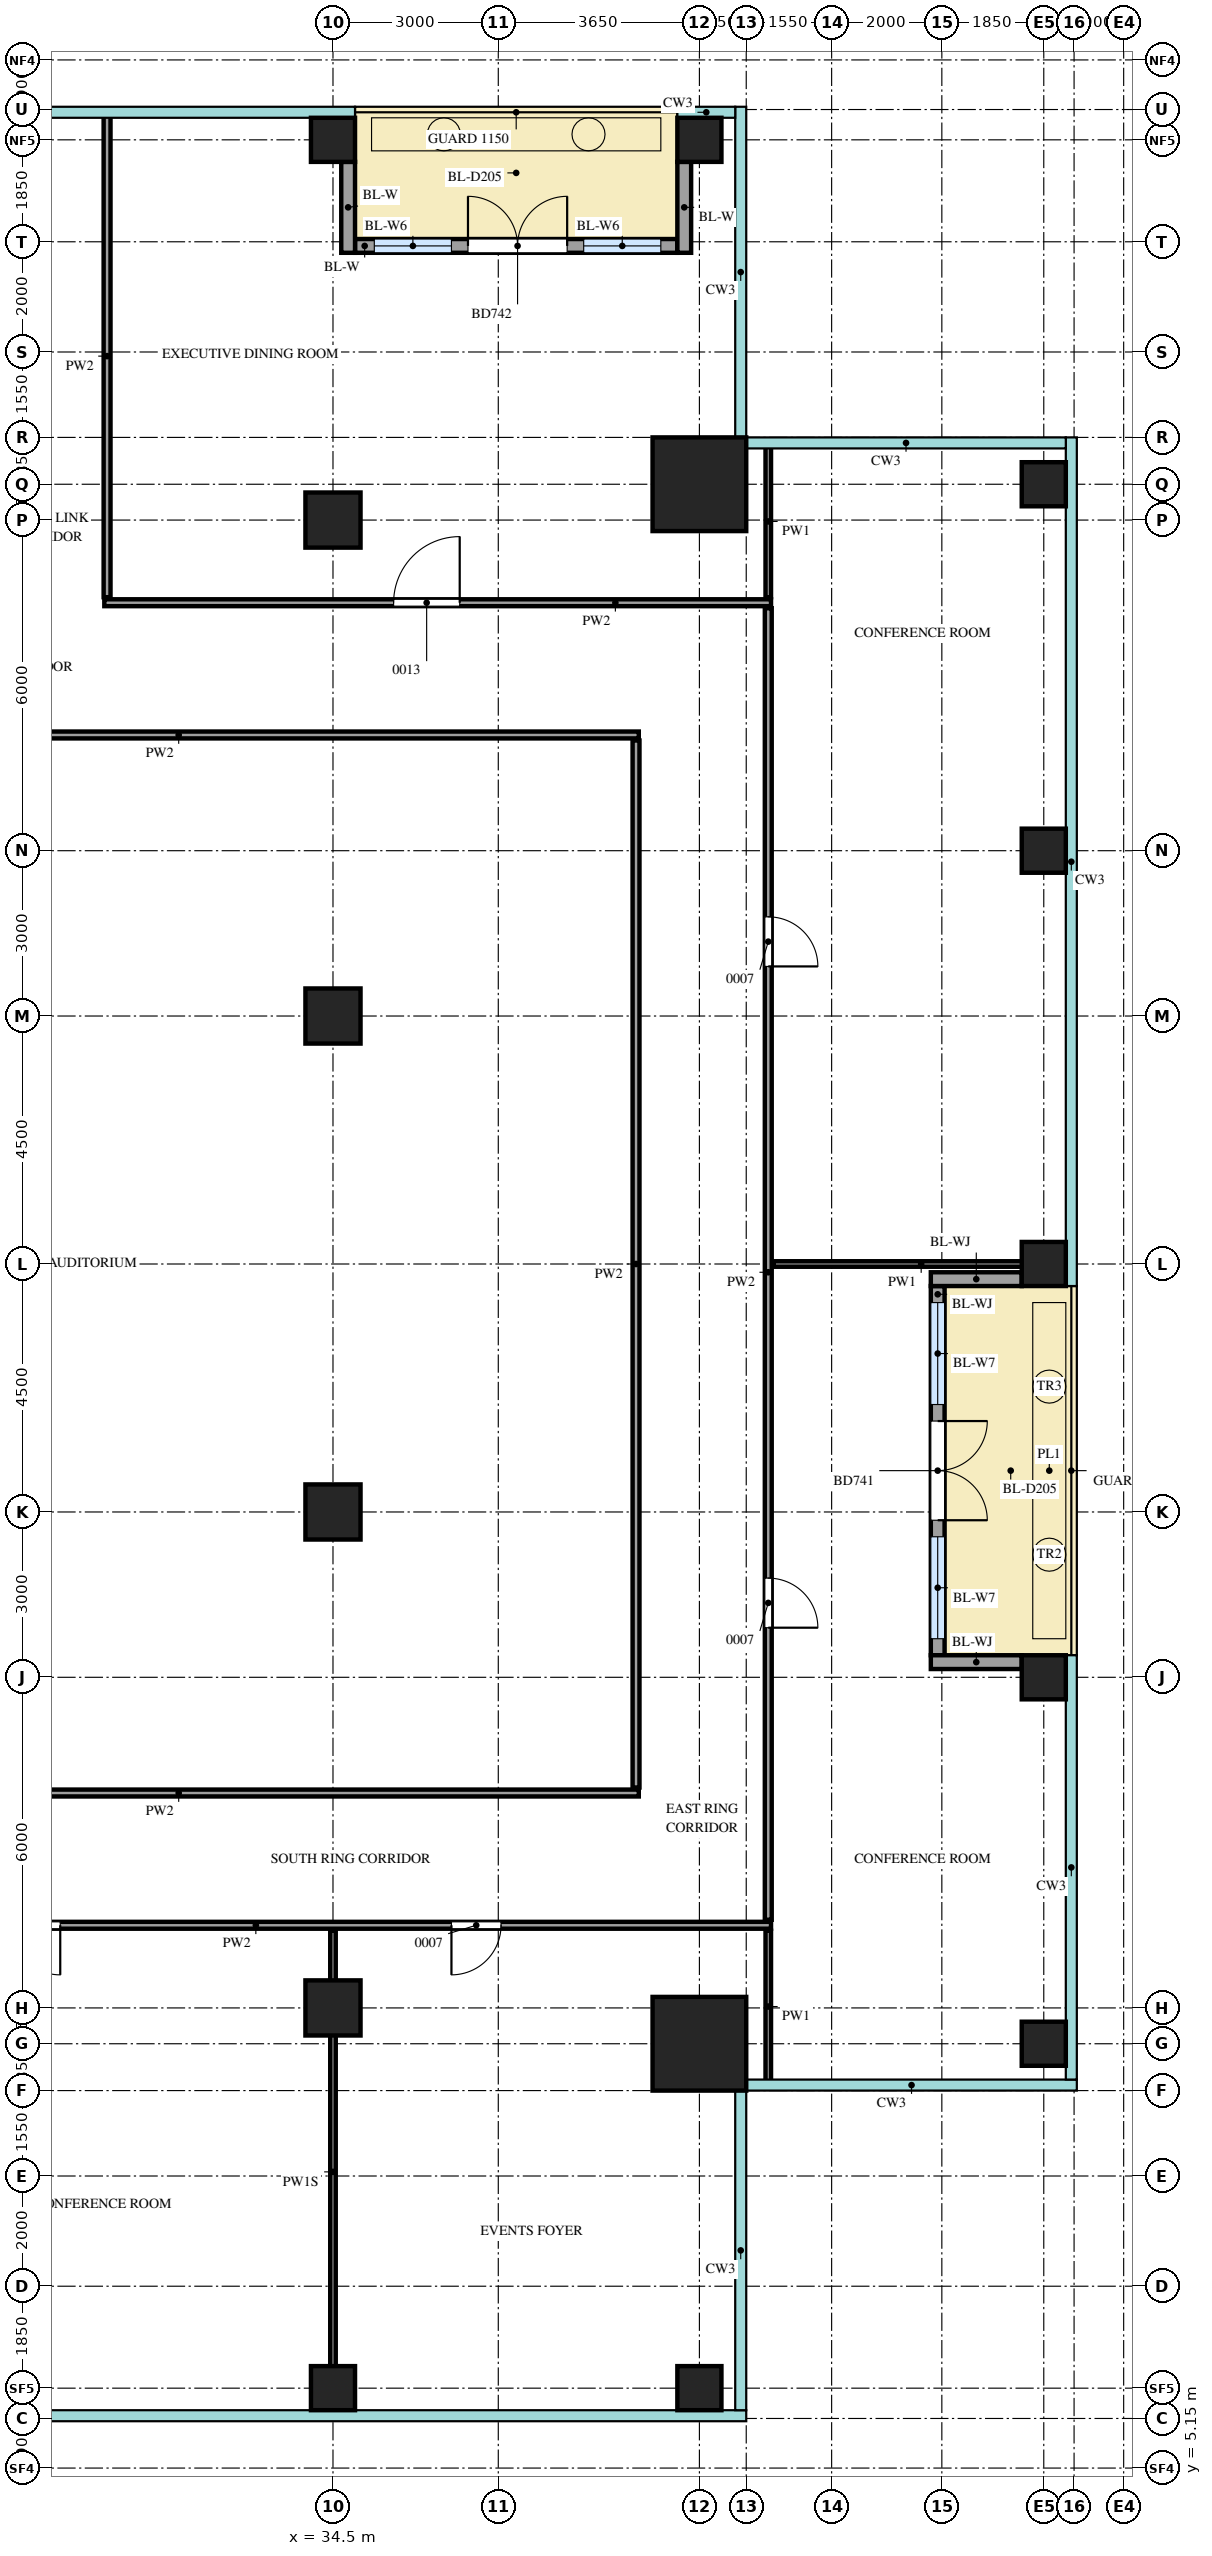
"""IFC4 building model, lengths in metres.
Left out: names, types, materials, properties, quantities, classifications, styles, units other than length and angle.
Written with IfcOpenShell. Run it as: python <this file> out.ifc"""

import sys

from ifc_helpers import new_model, si_unit, direction, frame, frame_2d, origin, origin_2d, place, context, subcontext, project, spatial, rectangle, extrude, source, transform, mapped, element, fill, save


model = new_model("IFC4")
c1 = context("Model", 3, precision=1e-05, world=origin(), true_north=direction((0.0, 1.0)))
c2 = subcontext(c1, "Body", "Model", "MODEL_VIEW")
j1 = project(units=[si_unit("LENGTHUNIT", "METRE"), si_unit("PLANEANGLEUNIT", "RADIAN")], contexts=[c1])
p1 = place(None, origin())
s1 = spatial("IfcSite", under=j1, at=p1, CompositionType="ELEMENT")
p2 = place(p1, origin())
s2 = spatial("IfcBuilding", under=s1, at=p2, CompositionType="ELEMENT")
p3 = place(p2, frame((0.0, 0.0, 326.2)))
s3 = spatial("IfcBuildingStorey", under=s2, at=p3, CompositionType="ELEMENT", Elevation=326.2)
m1 = source(origin(), c2, "Body", "SweptSolid", [
    extrude(rectangle(XDim=1.7, YDim=1.7, at=origin_2d()), origin(), (0.0, 0.0, 1.0), 3.75),
])
for number, where, z_axis, x_axis in (
    (1, (41.15, 41.15, 0.0), (0.0, 0.0, 1.0), (1.0, 0.0, 0.0)),
    (2, (41.15, 12.85, 0.0), (0.0, 0.0, 1.0), (1.0, 0.0, 0.0)),
):
    element("IfcColumn", number, at=place(p3, frame(where, z_axis=z_axis, x_axis=x_axis)), inside=s3, PredefinedType="COLUMN", context=c2, shape_type="MappedRepresentation", body=[
        mapped(m1, transform((0.0, 0.0, 0.0))),
    ])
m2 = source(origin(), c2, "Body", "SweptSolid", [
    extrude(rectangle(XDim=0.8, YDim=0.8, at=origin_2d()), origin(), (0.0, 0.0, 1.0), 3.75),
])
for number, where, z_axis, x_axis in (
    (3, (34.5, 6.6, 0.0), (0.0, 0.0, 1.0), (1.0, 0.0, 0.0)),
    (4, (41.15, 6.6, 0.0), (0.0, 0.0, 1.0), (1.0, 0.0, 0.0)),
    (5, (47.4, 12.85, 0.0), (0.0, 0.0, 1.0), (1.0, 0.0, 0.0)),
    (6, (47.4, 19.5, 0.0), (0.0, 0.0, 1.0), (1.0, 0.0, 0.0)),
    (7, (47.4, 27.0, 0.0), (0.0, 0.0, 1.0), (1.0, 0.0, 0.0)),
    (8, (47.4, 34.5, 0.0), (0.0, 0.0, 1.0), (1.0, 0.0, 0.0)),
    (9, (47.4, 41.15, 0.0), (0.0, 0.0, 1.0), (1.0, 0.0, 0.0)),
    (10, (34.5, 47.4, 0.0), (0.0, 0.0, 1.0), (1.0, 0.0, 0.0)),
    (11, (41.15, 47.4, 0.0), (0.0, 0.0, 1.0), (1.0, 0.0, 0.0)),
):
    element("IfcColumn", number, at=place(p3, frame(where, z_axis=z_axis, x_axis=x_axis)), inside=s3, PredefinedType="COLUMN", context=c2, shape_type="MappedRepresentation", body=[
        mapped(m2, transform((0.0, 0.0, 0.0))),
    ])
m3 = source(origin(), c2, "Body", "SweptSolid", [
    extrude(rectangle(XDim=1.0, YDim=1.0, at=origin_2d()), origin(), (0.0, 0.0, 1.0), 3.75),
])
for number, where, z_axis, x_axis in (
    (12, (34.5, 13.5, 0.0), (0.0, 0.0, 1.0), (1.0, 0.0, 0.0)),
    (13, (34.5, 22.5, 0.0), (0.0, 0.0, 1.0), (1.0, 0.0, 0.0)),
    (14, (34.5, 31.5, 0.0), (0.0, 0.0, 1.0), (1.0, 0.0, 0.0)),
    (15, (34.5, 40.5, 0.0), (0.0, 0.0, 1.0), (1.0, 0.0, 0.0)),
):
    element("IfcColumn", number, at=place(p3, frame(where, z_axis=z_axis, x_axis=x_axis)), inside=s3, PredefinedType="COLUMN", context=c2, shape_type="MappedRepresentation", body=[
        mapped(m3, transform((0.0, 0.0, 0.0))),
    ])
m4 = source(origin(), c2, "Body", "SweptSolid", [
    extrude(rectangle(XDim=6.7, YDim=0.25, at=frame_2d((3.35, 0.0))), origin(), (0.0, 0.0, 1.0), 3.2),
])
p4 = place(p3, frame((45.475, 19.9, 0.0), z_axis=(0.0, 0.0, 1.0), x_axis=(0.0, 1.0, 0.0)))
e16 = element("IfcWall", 16, at=p4, inside=s3, PredefinedType="SOLIDWALL", context=c2, shape_type="MappedRepresentation", body=[
    mapped(m4, transform((0.0, 0.0, 0.0))),
])
m5 = source(origin(), c2, "Body", "SweptSolid", [
    extrude(rectangle(XDim=1.85, YDim=2.4, at=frame_2d((0.925, 1.2))), frame((0.0, 0.135, 0.0), z_axis=(0.0, -1.0, 0.0), x_axis=(1.0, 0.0, 0.0)), (0.0, 0.0, 1.0), 0.27),
])
p5 = place(p4, frame((0.3, 0.0, 0.0)))
e17 = element("IfcOpeningElement", 17, at=p5, cuts=e16, PredefinedType="OPENING", context=c2, shape_type="MappedRepresentation", body=[
    mapped(m5, transform((0.0, 0.0, 0.0))),
])
p6 = place(p4, frame((4.55, 0.0, 0.0)))
e18 = element("IfcOpeningElement", 18, at=p6, cuts=e16, PredefinedType="OPENING", context=c2, shape_type="MappedRepresentation", body=[
    mapped(m5, transform((0.0, 0.0, 0.0))),
])
m6 = source(origin(), c2, "Body", "SweptSolid", [
    extrude(rectangle(XDim=1.8, YDim=2.4, at=frame_2d((0.9, 1.2))), frame((0.0, 0.135, 0.0), z_axis=(0.0, -1.0, 0.0), x_axis=(1.0, 0.0, 0.0)), (0.0, 0.0, 1.0), 0.27),
])
p7 = place(p4, frame((2.45, 0.0, 0.0)))
e19 = element("IfcOpeningElement", 19, at=p7, cuts=e16, PredefinedType="OPENING", context=c2, shape_type="MappedRepresentation", body=[
    mapped(m6, transform((0.0, 0.0, 0.0))),
])
m7 = source(origin(), c2, "Body", "SweptSolid", [
    extrude(rectangle(XDim=1.65, YDim=0.25, at=frame_2d((0.825, 0.0))), origin(), (0.0, 0.0, 1.0), 3.2),
])
for number, where, z_axis, x_axis in (
    (20, (47.0, 19.775, 0.0), (0.0, 0.0, 1.0), (-1.0, 0.0, 0.0)),
    (21, (47.0, 26.725, 0.0), (0.0, 0.0, 1.0), (-1.0, 0.0, 0.0)),
):
    element("IfcWall", number, at=place(p3, frame(where, z_axis=z_axis, x_axis=x_axis)), inside=s3, PredefinedType="SOLIDWALL", context=c2, shape_type="MappedRepresentation", body=[
        mapped(m7, transform((0.0, 0.0, 0.0))),
    ])
m8 = source(origin(), c2, "Body", "SweptSolid", [
    extrude(rectangle(XDim=5.85, YDim=0.25, at=frame_2d((2.925, 0.0))), origin(), (0.0, 0.0, 1.0), 3.75),
])
p8 = place(p3, frame((34.9, 45.475, 0.0), z_axis=(0.0, 0.0, 1.0), x_axis=(1.0, 0.0, 0.0)))
e22 = element("IfcWall", 22, at=p8, inside=s3, PredefinedType="SOLIDWALL", context=c2, shape_type="MappedRepresentation", body=[
    mapped(m8, transform((0.0, 0.0, 0.0))),
])
m9 = source(origin(), c2, "Body", "SweptSolid", [
    extrude(rectangle(XDim=1.4, YDim=2.4, at=frame_2d((0.7, 1.2))), frame((0.0, 0.135, 0.0), z_axis=(0.0, -1.0, 0.0), x_axis=(1.0, 0.0, 0.0)), (0.0, 0.0, 1.0), 0.27),
])
p9 = place(p8, frame((0.35, 0.0, 0.0)))
e23 = element("IfcOpeningElement", 23, at=p9, cuts=e22, PredefinedType="OPENING", context=c2, shape_type="MappedRepresentation", body=[
    mapped(m9, transform((0.0, 0.0, 0.0))),
])
p10 = place(p8, frame((4.15, 0.0, 0.0)))
e24 = element("IfcOpeningElement", 24, at=p10, cuts=e22, PredefinedType="OPENING", context=c2, shape_type="MappedRepresentation", body=[
    mapped(m9, transform((0.0, 0.0, 0.0))),
])
p11 = place(p8, frame((2.05, 0.0, 0.0)))
e25 = element("IfcOpeningElement", 25, at=p11, cuts=e22, PredefinedType="OPENING", context=c2, shape_type="MappedRepresentation", body=[
    mapped(m6, transform((0.0, 0.0, 0.0))),
])
m10 = source(origin(), c2, "Body", "SweptSolid", [
    extrude(rectangle(XDim=1.65, YDim=0.25, at=frame_2d((0.825, 0.0))), origin(), (0.0, 0.0, 1.0), 3.75),
])
for number, where, z_axis, x_axis in (
    (26, (34.775, 47.0, 0.0), (0.0, 0.0, 1.0), (0.0, -1.0, 0.0)),
    (27, (40.875, 47.0, 0.0), (0.0, 0.0, 1.0), (0.0, -1.0, 0.0)),
):
    element("IfcWall", number, at=place(p3, frame(where, z_axis=z_axis, x_axis=x_axis)), inside=s3, PredefinedType="SOLIDWALL", context=c2, shape_type="MappedRepresentation", body=[
        mapped(m10, transform((0.0, 0.0, 0.0))),
    ])
m11 = source(origin(), c2, "Body", "SweptSolid", [
    extrude(rectangle(XDim=8.75, YDim=0.1, at=frame_2d((4.375, 0.0))), origin(), (0.0, 0.0, 1.0), 3.35),
])
p12 = place(p3, frame((34.5, 6.15, 0.0), z_axis=(0.0, 0.0, 1.0), x_axis=(0.0, 1.0, 0.0)))
e28 = element("IfcWall", 28, at=p12, inside=s3, PredefinedType="PARTITIONING", context=c2, shape_type="MappedRepresentation", body=[
    mapped(m11, transform((0.0, 0.0, 0.0))),
])
m12 = source(origin(), c2, "Body", "SweptSolid", [
    extrude(rectangle(XDim=2.75, YDim=0.1, at=frame_2d((1.375, 0.0))), origin(), (0.0, 0.0, 1.0), 3.8),
])
p13 = place(p3, frame((42.4, 12.15, 0.0), z_axis=(0.0, 0.0, 1.0), x_axis=(0.0, 1.0, 0.0)))
e29 = element("IfcWall", 29, at=p13, inside=s3, PredefinedType="PARTITIONING", context=c2, shape_type="MappedRepresentation", body=[
    mapped(m12, transform((0.0, 0.0, 0.0))),
])
m13 = source(origin(), c2, "Body", "SweptSolid", [
    extrude(rectangle(XDim=19.1, YDim=0.125, at=frame_2d((9.55, 0.0))), origin(), (0.0, 0.0, 1.0), 3.8),
])
p14 = place(p3, frame((23.35, 15.0, 0.0), z_axis=(0.0, 0.0, 1.0), x_axis=(1.0, 0.0, 0.0)))
e30 = element("IfcWall", 30, at=p14, inside=s3, PredefinedType="PARTITIONING", context=c2, shape_type="MappedRepresentation", body=[
    mapped(m13, transform((0.0, 0.0, 0.0))),
])
m14 = source(origin(), c2, "Body", "SweptSolid", [
    extrude(rectangle(XDim=0.9, YDim=2.1, at=frame_2d((0.45, 1.05))), frame((0.0, 0.073, 0.0), z_axis=(0.0, -1.0, 0.0), x_axis=(1.0, 0.0, 0.0)), (0.0, 0.0, 1.0), 0.145),
])
p15 = place(p14, frame((5.3, 0.0, 0.0)))
e31 = element("IfcOpeningElement", 31, at=p15, cuts=e30, PredefinedType="OPENING", context=c2, shape_type="MappedRepresentation", body=[
    mapped(m14, transform((0.0, 0.0, 0.0))),
])
p16 = place(p14, frame((13.3, 0.0, 0.0)))
e32 = element("IfcOpeningElement", 32, at=p16, cuts=e30, PredefinedType="OPENING", context=c2, shape_type="MappedRepresentation", body=[
    mapped(m14, transform((0.0, 0.0, 0.0))),
])
m15 = source(origin(), c2, "Body", "SweptSolid", [
    extrude(rectangle(XDim=23.8, YDim=0.125, at=frame_2d((11.9, 0.0))), origin(), (0.0, 0.0, 1.0), 3.8),
])
p17 = place(p3, frame((42.4, 15.1, 0.0), z_axis=(0.0, 0.0, 1.0), x_axis=(0.0, 1.0, 0.0)))
e33 = element("IfcWall", 33, at=p17, inside=s3, PredefinedType="PARTITIONING", context=c2, shape_type="MappedRepresentation", body=[
    mapped(m15, transform((0.0, 0.0, 0.0))),
])
p18 = place(p17, frame((5.3, 0.0, 0.0)))
e34 = element("IfcOpeningElement", 34, at=p18, cuts=e33, PredefinedType="OPENING", context=c2, shape_type="MappedRepresentation", body=[
    mapped(m14, transform((0.0, 0.0, 0.0))),
])
p19 = place(p17, frame((17.3, 0.0, 0.0)))
e35 = element("IfcOpeningElement", 35, at=p19, cuts=e33, PredefinedType="OPENING", context=c2, shape_type="MappedRepresentation", body=[
    mapped(m14, transform((0.0, 0.0, 0.0))),
])
m16 = source(origin(), c2, "Body", "SweptSolid", [
    extrude(rectangle(XDim=16.7, YDim=0.125, at=frame_2d((8.35, 0.0))), origin(), (0.0, 0.0, 1.0), 3.8),
])
p20 = place(p3, frame((23.35, 17.4, 0.0), z_axis=(0.0, 0.0, 1.0), x_axis=(1.0, 0.0, 0.0)))
e36 = element("IfcWall", 36, at=p20, inside=s3, PredefinedType="PARTITIONING", context=c2, shape_type="MappedRepresentation", body=[
    mapped(m16, transform((0.0, 0.0, 0.0))),
])
m17 = source(origin(), c2, "Body", "SweptSolid", [
    extrude(rectangle(XDim=19.0, YDim=0.125, at=frame_2d((9.5, 0.0))), origin(), (0.0, 0.0, 1.0), 3.8),
])
p21 = place(p3, frame((40.0, 17.5, 0.0), z_axis=(0.0, 0.0, 1.0), x_axis=(0.0, 1.0, 0.0)))
e37 = element("IfcWall", 37, at=p21, inside=s3, PredefinedType="PARTITIONING", context=c2, shape_type="MappedRepresentation", body=[
    mapped(m17, transform((0.0, 0.0, 0.0))),
])
m18 = source(origin(), c2, "Body", "SweptSolid", [
    extrude(rectangle(XDim=5.35, YDim=0.1, at=frame_2d((2.675, 0.0))), origin(), (0.0, 0.0, 1.0), 3.8),
])
p22 = place(p3, frame((42.5, 27.0, 0.0), z_axis=(0.0, 0.0, 1.0), x_axis=(1.0, 0.0, 0.0)))
e38 = element("IfcWall", 38, at=p22, inside=s3, PredefinedType="PARTITIONING", context=c2, shape_type="MappedRepresentation", body=[
    mapped(m18, transform((0.0, 0.0, 0.0))),
])
p23 = place(p3, frame((23.35, 36.6, 0.0), z_axis=(0.0, 0.0, 1.0), x_axis=(1.0, 0.0, 0.0)))
e39 = element("IfcWall", 39, at=p23, inside=s3, PredefinedType="PARTITIONING", context=c2, shape_type="MappedRepresentation", body=[
    mapped(m16, transform((0.0, 0.0, 0.0))),
])
m19 = source(origin(), c2, "Body", "SweptSolid", [
    extrude(rectangle(XDim=12.1, YDim=0.125, at=frame_2d((6.05, 0.0))), origin(), (0.0, 0.0, 1.0), 3.8),
])
p24 = place(p3, frame((30.35, 39.0, 0.0), z_axis=(0.0, 0.0, 1.0), x_axis=(1.0, 0.0, 0.0)))
e40 = element("IfcWall", 40, at=p24, inside=s3, PredefinedType="PARTITIONING", context=c2, shape_type="MappedRepresentation", body=[
    mapped(m19, transform((0.0, 0.0, 0.0))),
])
m20 = source(origin(), c2, "Body", "SweptSolid", [
    extrude(rectangle(XDim=1.2, YDim=2.1, at=frame_2d((0.6, 1.05))), frame((0.0, 0.073, 0.0), z_axis=(0.0, -1.0, 0.0), x_axis=(1.0, 0.0, 0.0)), (0.0, 0.0, 1.0), 0.145),
])
p25 = place(p24, frame((5.25, 0.0, 0.0)))
e41 = element("IfcOpeningElement", 41, at=p25, cuts=e40, PredefinedType="OPENING", context=c2, shape_type="MappedRepresentation", body=[
    mapped(m20, transform((0.0, 0.0, 0.0))),
])
m21 = source(origin(), c2, "Body", "SweptSolid", [
    extrude(rectangle(XDim=8.75, YDim=0.125, at=frame_2d((4.375, 0.0))), origin(), (0.0, 0.0, 1.0), 3.8),
])
p26 = place(p3, frame((30.4, 39.1, 0.0), z_axis=(0.0, 0.0, 1.0), x_axis=(0.0, 1.0, 0.0)))
e42 = element("IfcWall", 42, at=p26, inside=s3, PredefinedType="PARTITIONING", context=c2, shape_type="MappedRepresentation", body=[
    mapped(m21, transform((0.0, 0.0, 0.0))),
])
p27 = place(p3, frame((42.4, 39.1, 0.0), z_axis=(0.0, 0.0, 1.0), x_axis=(0.0, 1.0, 0.0)))
e43 = element("IfcWall", 43, at=p27, inside=s3, PredefinedType="PARTITIONING", context=c2, shape_type="MappedRepresentation", body=[
    mapped(m12, transform((0.0, 0.0, 0.0))),
])
m22 = source(origin(), c2, "Body", "SweptSolid", [
    extrude(rectangle(XDim=1.85, YDim=2.4, at=frame_2d((0.925, 1.2))), frame((0.0, 0.03, 0.0), z_axis=(0.0, -1.0, 0.0), x_axis=(1.0, 0.0, 0.0)), (0.0, 0.0, 1.0), 0.06),
])
p28 = place(p5, origin())
e44 = element("IfcWindow", 44, at=p28, inside=s3, PartitioningType="SINGLE_PANEL", PredefinedType="WINDOW", context=c2, shape_type="MappedRepresentation", body=[
    mapped(m22, transform((0.0, 0.0, 0.0))),
])
fill(e17, e44)
p29 = place(p6, origin())
e45 = element("IfcWindow", 45, at=p29, inside=s3, PartitioningType="SINGLE_PANEL", PredefinedType="WINDOW", context=c2, shape_type="MappedRepresentation", body=[
    mapped(m22, transform((0.0, 0.0, 0.0))),
])
fill(e18, e45)
m23 = source(origin(), c2, "Body", "SweptSolid", [
    extrude(rectangle(XDim=1.8, YDim=2.4, at=frame_2d((0.9, 1.2))), frame((0.0, 0.025, 0.0), z_axis=(0.0, -1.0, 0.0), x_axis=(1.0, 0.0, 0.0)), (0.0, 0.0, 1.0), 0.05),
])
p30 = place(p7, origin())
e46 = element("IfcDoor", 46, at=p30, inside=s3, OperationType="DOUBLE_DOOR_DOUBLE_SWING", PredefinedType="DOOR", context=c2, shape_type="MappedRepresentation", body=[
    mapped(m23, transform((0.0, 0.0, 0.0))),
])
fill(e19, e46)
m24 = source(origin(), c2, "Body", "SweptSolid", [
    extrude(rectangle(XDim=1.4, YDim=2.4, at=frame_2d((0.7, 1.2))), frame((0.0, 0.03, 0.0), z_axis=(0.0, -1.0, 0.0), x_axis=(1.0, 0.0, 0.0)), (0.0, 0.0, 1.0), 0.06),
])
p31 = place(p9, origin())
e47 = element("IfcWindow", 47, at=p31, inside=s3, PartitioningType="SINGLE_PANEL", PredefinedType="WINDOW", context=c2, shape_type="MappedRepresentation", body=[
    mapped(m24, transform((0.0, 0.0, 0.0))),
])
fill(e23, e47)
p32 = place(p10, origin())
e48 = element("IfcWindow", 48, at=p32, inside=s3, PartitioningType="SINGLE_PANEL", PredefinedType="WINDOW", context=c2, shape_type="MappedRepresentation", body=[
    mapped(m24, transform((0.0, 0.0, 0.0))),
])
fill(e24, e48)
p33 = place(p11, origin())
e49 = element("IfcDoor", 49, at=p33, inside=s3, OperationType="DOUBLE_DOOR_DOUBLE_SWING", PredefinedType="DOOR", context=c2, shape_type="MappedRepresentation", body=[
    mapped(m23, transform((0.0, 0.0, 0.0))),
])
fill(e25, e49)
m25 = source(origin(), c2, "Body", "SweptSolid", [
    extrude(rectangle(XDim=0.9, YDim=2.1, at=frame_2d((0.45, 1.05))), frame((0.0, 0.025, 0.0), z_axis=(0.0, -1.0, 0.0), x_axis=(1.0, 0.0, 0.0)), (0.0, 0.0, 1.0), 0.05),
])
p34 = place(p15, origin())
e50 = element("IfcDoor", 50, at=p34, inside=s3, OperationType="SINGLE_SWING_RIGHT", PredefinedType="DOOR", context=c2, shape_type="MappedRepresentation", body=[
    mapped(m25, transform((0.0, 0.0, 0.0))),
])
fill(e31, e50)
p35 = place(p16, origin())
e51 = element("IfcDoor", 51, at=p35, inside=s3, OperationType="SINGLE_SWING_LEFT", PredefinedType="DOOR", context=c2, shape_type="MappedRepresentation", body=[
    mapped(m25, transform((0.0, 0.0, 0.0))),
])
fill(e32, e51)
p36 = place(p18, origin())
e52 = element("IfcDoor", 52, at=p36, inside=s3, OperationType="SINGLE_SWING_LEFT", PredefinedType="DOOR", context=c2, shape_type="MappedRepresentation", body=[
    mapped(m25, transform((0.0, 0.0, 0.0))),
])
fill(e34, e52)
p37 = place(p19, origin())
e53 = element("IfcDoor", 53, at=p37, inside=s3, OperationType="SINGLE_SWING_LEFT", PredefinedType="DOOR", context=c2, shape_type="MappedRepresentation", body=[
    mapped(m25, transform((0.0, 0.0, 0.0))),
])
fill(e35, e53)
m26 = source(origin(), c2, "Body", "SweptSolid", [
    extrude(rectangle(XDim=1.2, YDim=2.1, at=frame_2d((0.6, 1.05))), frame((0.0, 0.025, 0.0), z_axis=(0.0, -1.0, 0.0), x_axis=(1.0, 0.0, 0.0)), (0.0, 0.0, 1.0), 0.05),
])
p38 = place(p25, origin())
e54 = element("IfcDoor", 54, at=p38, inside=s3, OperationType="SINGLE_SWING_LEFT", PredefinedType="DOOR", context=c2, shape_type="MappedRepresentation", body=[
    mapped(m26, transform((0.0, 0.0, 0.0))),
])
fill(e41, e54)
save(model, sys.argv[1])
